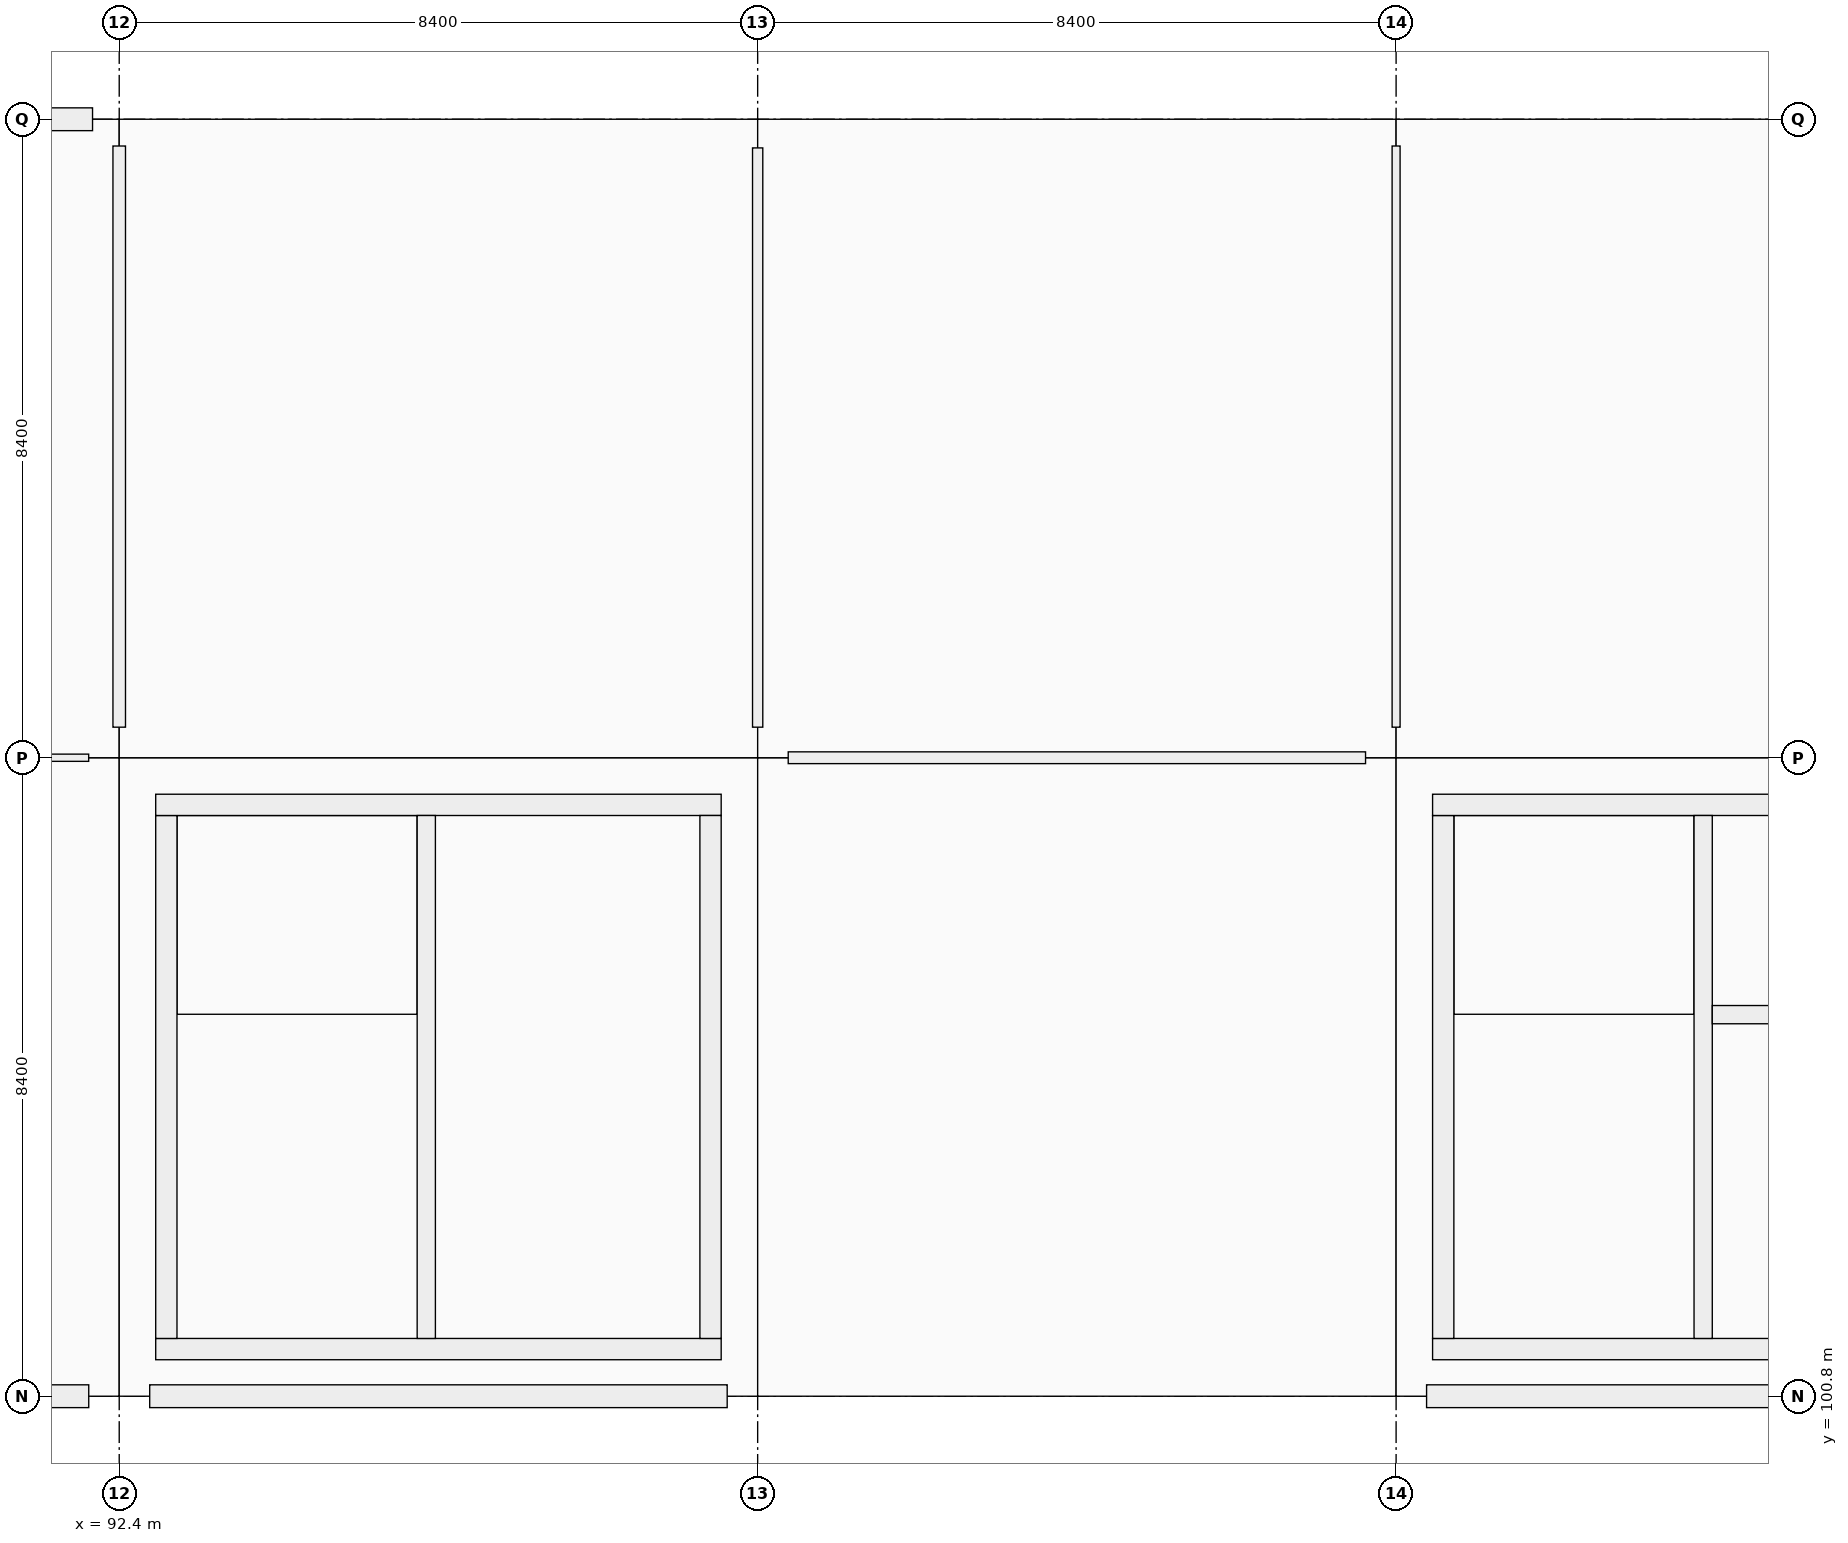
"""IFC4 building model, lengths in metres.
Left out: names, types, materials, properties, quantities, classifications, styles, units other than length and angle.
Written with IfcOpenShell. Run it as: python <this file> out.ifc"""

import sys

from ifc_helpers import new_model, si_unit, direction, frame, frame_2d, origin, origin_2d, place, context, subcontext, project, spatial, rectangle, extrude, element, fill, save


model = new_model("IFC4")
c1 = context("Model", 3, precision=1e-05, world=origin(), true_north=direction((0.0, 1.0)))
c2 = subcontext(c1, "Body", "Model", "MODEL_VIEW")
j1 = project(units=[si_unit("LENGTHUNIT", "METRE"), si_unit("PLANEANGLEUNIT", "RADIAN")], contexts=[c1])
p1 = place(None, origin())
s1 = spatial("IfcSite", under=j1, at=p1, CompositionType="ELEMENT")
p2 = place(p1, origin())
s2 = spatial("IfcBuilding", under=s1, at=p2, CompositionType="ELEMENT")
p3 = place(p2, frame((0.0, 0.0, 14.76)))
s3 = spatial("IfcBuildingStorey", under=s2, at=p3, CompositionType="ELEMENT", Elevation=14.76)
for number, where, z_axis, x_axis in (
    (1, (92.4, 100.8, 0.0), (0.0, 0.0, 1.0), (1.0, 0.0, 0.0)),
    (2, (92.4, 109.2, 0.0), (0.0, 0.0, 1.0), (1.0, 0.0, 0.0)),
):
    element("IfcColumn", number, at=place(p3, frame(where, z_axis=z_axis, x_axis=x_axis)), inside=s3, PredefinedType="COLUMN", context=c2, shape_type="SweptSolid", body=[
        extrude(rectangle(XDim=0.8, YDim=0.8, at=origin_2d()), origin(), (0.0, 0.0, 1.0), 4.32),
    ])
p4 = place(p3, frame((92.4, 117.6, 0.0), z_axis=(0.0, 0.0, 1.0), x_axis=(1.0, 0.0, 0.0)))
e3 = element("IfcColumn", 3, at=p4, inside=s3, PredefinedType="COLUMN", context=c2, shape_type="SweptSolid", body=[
    extrude(rectangle(XDim=0.7, YDim=0.7, at=origin_2d()), origin(), (0.0, 0.0, 1.0), 4.32),
])
for number, where, z_axis, x_axis in (
    (4, (100.8, 100.8, 0.0), (0.0, 0.0, 1.0), (1.0, 0.0, 0.0)),
    (5, (100.8, 109.2, 0.0), (0.0, 0.0, 1.0), (1.0, 0.0, 0.0)),
):
    element("IfcColumn", number, at=place(p3, frame(where, z_axis=z_axis, x_axis=x_axis)), inside=s3, PredefinedType="COLUMN", context=c2, shape_type="SweptSolid", body=[
        extrude(rectangle(XDim=0.8, YDim=0.8, at=origin_2d()), origin(), (0.0, 0.0, 1.0), 4.32),
    ])
p5 = place(p3, frame((100.8, 117.6, 0.0), z_axis=(0.0, 0.0, 1.0), x_axis=(1.0, 0.0, 0.0)))
e6 = element("IfcColumn", 6, at=p5, inside=s3, PredefinedType="COLUMN", context=c2, shape_type="SweptSolid", body=[
    extrude(rectangle(XDim=0.75, YDim=0.75, at=origin_2d()), origin(), (0.0, 0.0, 1.0), 4.32),
])
for number, where, z_axis, x_axis in (
    (7, (109.2, 100.8, 0.0), (0.0, 0.0, 1.0), (1.0, 0.0, 0.0)),
    (8, (109.2, 109.2, 0.0), (0.0, 0.0, 1.0), (1.0, 0.0, 0.0)),
):
    element("IfcColumn", number, at=place(p3, frame(where, z_axis=z_axis, x_axis=x_axis)), inside=s3, PredefinedType="COLUMN", context=c2, shape_type="SweptSolid", body=[
        extrude(rectangle(XDim=0.8, YDim=0.8, at=origin_2d()), origin(), (0.0, 0.0, 1.0), 4.32),
    ])
p6 = place(p3, frame((109.2, 117.6, 0.0), z_axis=(0.0, 0.0, 1.0), x_axis=(1.0, 0.0, 0.0)))
e9 = element("IfcColumn", 9, at=p6, inside=s3, PredefinedType="COLUMN", context=c2, shape_type="SweptSolid", body=[
    extrude(rectangle(XDim=0.7, YDim=0.7, at=origin_2d()), origin(), (0.0, 0.0, 1.0), 4.32),
])
p7 = place(p3, frame((91.999, 100.8, 0.0), z_axis=(0.0, 0.0, 1.0), x_axis=(-1.0, 0.0, 0.0)))
e10 = element("IfcWall", 10, at=p7, inside=s3, PredefinedType="SOLIDWALL", context=c2, shape_type="SweptSolid", body=[
    extrude(rectangle(XDim=7.598, YDim=0.3, at=frame_2d((3.799, 0.0))), origin(), (0.0, 0.0, 1.0), 3.37),
])
p8 = place(p7, frame((2.824, 0.0, 0.9)))
e11 = element("IfcOpeningElement", 11, at=p8, cuts=e10, PredefinedType="OPENING", context=c2, shape_type="SweptSolid", body=[
    extrude(rectangle(XDim=1.95, YDim=1.6, at=frame_2d((0.975, 0.8))), frame((0.0, 0.15, 0.0), z_axis=(0.0, -1.0, 0.0), x_axis=(1.0, 0.0, 0.0)), (0.0, 0.0, 1.0), 0.3),
])
p9 = place(p3, frame((84.376, 117.6, 0.0), z_axis=(0.0, 0.0, 1.0), x_axis=(1.0, 0.0, 0.0)))
e12 = element("IfcWall", 12, at=p9, inside=s3, PredefinedType="SOLIDWALL", context=c2, shape_type="SweptSolid", body=[
    extrude(rectangle(XDim=7.673, YDim=0.3, at=frame_2d((3.836, 0.0))), origin(), (0.0, 0.0, 1.0), 3.37),
])
p10 = place(p9, frame((2.662, 0.0, 0.9)))
e13 = element("IfcOpeningElement", 13, at=p10, cuts=e12, PredefinedType="OPENING", context=c2, shape_type="SweptSolid", body=[
    extrude(rectangle(XDim=2.35, YDim=1.6, at=frame_2d((1.175, 0.8))), frame((0.0, 0.15, 0.0), z_axis=(0.0, -1.0, 0.0), x_axis=(1.0, 0.0, 0.0)), (0.0, 0.0, 1.0), 0.3),
])
for number, where, z_axis, x_axis in (
    (14, (100.399, 100.8, 0.0), (0.0, 0.0, 1.0), (-1.0, 0.0, 0.0)),
    (15, (117.199, 100.8, 0.0), (0.0, 0.0, 1.0), (-1.0, 0.0, 0.0)),
):
    element("IfcWall", number, at=place(p3, frame(where, z_axis=z_axis, x_axis=x_axis)), inside=s3, PredefinedType="SOLIDWALL", context=c2, shape_type="SweptSolid", body=[
        extrude(rectangle(XDim=7.598, YDim=0.3, at=frame_2d((3.799, 0.0))), origin(), (0.0, 0.0, 1.0), 3.37),
    ])
p11 = place(p3, frame((117.12, 101.42, 0.0), z_axis=(0.0, 0.0, 1.0), x_axis=(-1.0, 0.0, 0.0)))
e16 = element("IfcWall", 16, at=p11, inside=s3, PredefinedType="SHEAR", context=c2, shape_type="SweptSolid", body=[
    extrude(rectangle(XDim=7.44, YDim=0.28, at=frame_2d((3.72, 0.0))), origin(), (0.0, 0.0, 1.0), 4.32),
])
p12 = place(p3, frame((109.82, 101.56, 0.0), z_axis=(0.0, 0.0, 1.0), x_axis=(0.0, 1.0, 0.0)))
e17 = element("IfcWall", 17, at=p12, inside=s3, PredefinedType="SHEAR", context=c2, shape_type="SweptSolid", body=[
    extrude(rectangle(XDim=6.88, YDim=0.28, at=frame_2d((3.44, 0.0))), origin(), (0.0, 0.0, 1.0), 4.32),
])
p13 = place(p3, frame((109.68, 108.58, 0.0), z_axis=(0.0, 0.0, 1.0), x_axis=(1.0, 0.0, 0.0)))
e18 = element("IfcWall", 18, at=p13, inside=s3, PredefinedType="SHEAR", context=c2, shape_type="SweptSolid", body=[
    extrude(rectangle(XDim=7.44, YDim=0.28, at=frame_2d((3.72, 0.0))), origin(), (0.0, 0.0, 1.0), 4.32),
])
p14 = place(p3, frame((113.24, 101.56, 0.0), z_axis=(0.0, 0.0, 1.0), x_axis=(0.0, 1.0, 0.0)))
e19 = element("IfcWall", 19, at=p14, inside=s3, PredefinedType="SHEAR", context=c2, shape_type="SweptSolid", body=[
    extrude(rectangle(XDim=6.88, YDim=0.24, at=frame_2d((3.44, 0.0))), origin(), (0.0, 0.0, 1.0), 4.32),
])
p15 = place(p14, frame((0.12, 0.0, 0.0)))
e20 = element("IfcOpeningElement", 20, at=p15, cuts=e19, PredefinedType="OPENING", context=c2, shape_type="SweptSolid", body=[
    extrude(rectangle(XDim=1.0, YDim=2.15, at=frame_2d((0.5, 1.075))), frame((0.0, 0.12, 0.0), z_axis=(0.0, -1.0, 0.0), x_axis=(1.0, 0.0, 0.0)), (0.0, 0.0, 1.0), 0.24),
])
p16 = place(p3, frame((113.36, 105.82, 0.0), z_axis=(0.0, 0.0, 1.0), x_axis=(1.0, 0.0, 0.0)))
e21 = element("IfcWall", 21, at=p16, inside=s3, PredefinedType="SHEAR", context=c2, shape_type="SweptSolid", body=[
    extrude(rectangle(XDim=3.48, YDim=0.24, at=frame_2d((1.74, 0.0))), origin(), (0.0, 0.0, 1.0), 4.32),
])
p17 = place(p16, frame((1.14, 0.0, 0.0)))
e22 = element("IfcOpeningElement", 22, at=p17, cuts=e21, PredefinedType="OPENING", context=c2, shape_type="SweptSolid", body=[
    extrude(rectangle(XDim=1.2, YDim=2.2, at=frame_2d((0.6, 1.1))), frame((0.0, 0.12, 0.0), z_axis=(0.0, -1.0, 0.0), x_axis=(1.0, 0.0, 0.0)), (0.0, 0.0, 1.0), 0.24),
])
p18 = place(p3, frame((100.32, 101.42, 0.0), z_axis=(0.0, 0.0, 1.0), x_axis=(-1.0, 0.0, 0.0)))
e23 = element("IfcWall", 23, at=p18, inside=s3, PredefinedType="SHEAR", context=c2, shape_type="SweptSolid", body=[
    extrude(rectangle(XDim=7.44, YDim=0.28, at=frame_2d((3.72, 0.0))), origin(), (0.0, 0.0, 1.0), 4.32),
])
p19 = place(p3, frame((93.02, 101.56, 0.0), z_axis=(0.0, 0.0, 1.0), x_axis=(0.0, 1.0, 0.0)))
e24 = element("IfcWall", 24, at=p19, inside=s3, PredefinedType="SHEAR", context=c2, shape_type="SweptSolid", body=[
    extrude(rectangle(XDim=6.88, YDim=0.28, at=frame_2d((3.44, 0.0))), origin(), (0.0, 0.0, 1.0), 4.32),
])
p20 = place(p3, frame((92.88, 108.58, 0.0), z_axis=(0.0, 0.0, 1.0), x_axis=(1.0, 0.0, 0.0)))
e25 = element("IfcWall", 25, at=p20, inside=s3, PredefinedType="SHEAR", context=c2, shape_type="SweptSolid", body=[
    extrude(rectangle(XDim=7.44, YDim=0.28, at=frame_2d((3.72, 0.0))), origin(), (0.0, 0.0, 1.0), 4.32),
])
p21 = place(p3, frame((100.18, 108.44, 0.0), z_axis=(0.0, 0.0, 1.0), x_axis=(0.0, -1.0, 0.0)))
e26 = element("IfcWall", 26, at=p21, inside=s3, PredefinedType="SHEAR", context=c2, shape_type="SweptSolid", body=[
    extrude(rectangle(XDim=6.88, YDim=0.28, at=frame_2d((3.44, 0.0))), origin(), (0.0, 0.0, 1.0), 4.32),
])
p22 = place(p21, frame((3.99, 0.0, 0.0)))
e27 = element("IfcOpeningElement", 27, at=p22, cuts=e26, PredefinedType="OPENING", context=c2, shape_type="SweptSolid", body=[
    extrude(rectangle(XDim=1.5, YDim=2.15, at=frame_2d((0.75, 1.075))), frame((0.0, 0.14, 0.0), z_axis=(0.0, -1.0, 0.0), x_axis=(1.0, 0.0, 0.0)), (0.0, 0.0, 1.0), 0.28),
])
p23 = place(p3, frame((96.44, 101.56, 0.0), z_axis=(0.0, 0.0, 1.0), x_axis=(0.0, 1.0, 0.0)))
e28 = element("IfcWall", 28, at=p23, inside=s3, PredefinedType="SHEAR", context=c2, shape_type="SweptSolid", body=[
    extrude(rectangle(XDim=6.88, YDim=0.24, at=frame_2d((3.44, 0.0))), origin(), (0.0, 0.0, 1.0), 4.32),
])
p24 = place(p23, frame((0.12, 0.0, 0.0)))
e29 = element("IfcOpeningElement", 29, at=p24, cuts=e28, PredefinedType="OPENING", context=c2, shape_type="SweptSolid", body=[
    extrude(rectangle(XDim=1.0, YDim=2.15, at=frame_2d((0.5, 1.075))), frame((0.0, 0.12, 0.0), z_axis=(0.0, -1.0, 0.0), x_axis=(1.0, 0.0, 0.0)), (0.0, 0.0, 1.0), 0.24),
])
p25 = place(p3, frame((84.402, 109.2, 0.0), z_axis=(0.0, 0.0, 1.0), x_axis=(1.0, 0.0, 0.0)))
e30 = element("IfcWall", 30, at=p25, inside=s3, PredefinedType="PARTITIONING", context=c2, shape_type="SweptSolid", body=[
    extrude(rectangle(XDim=7.596, YDim=0.095, at=frame_2d((3.798, 0.0))), origin(), (0.0, 0.0, 1.0), 3.19),
])
p26 = place(p25, frame((3.308, 0.0, 0.0)))
e31 = element("IfcOpeningElement", 31, at=p26, cuts=e30, PredefinedType="OPENING", context=c2, shape_type="SweptSolid", body=[
    extrude(rectangle(XDim=0.98, YDim=2.18, at=frame_2d((0.49, 1.09))), frame((0.0, 0.047, 0.0), z_axis=(0.0, -1.0, 0.0), x_axis=(1.0, 0.0, 0.0)), (0.0, 0.0, 1.0), 0.095),
])
p27 = place(p3, frame((101.202, 109.2, 0.0), z_axis=(0.0, 0.0, 1.0), x_axis=(1.0, 0.0, 0.0)))
e32 = element("IfcWall", 32, at=p27, inside=s3, PredefinedType="PARTITIONING", context=c2, shape_type="SweptSolid", body=[
    extrude(rectangle(XDim=7.596, YDim=0.155, at=frame_2d((3.798, 0.0))), origin(), (0.0, 0.0, 1.0), 3.19),
])
p28 = place(p27, frame((3.273, 0.0, 0.0)))
e33 = element("IfcOpeningElement", 33, at=p28, cuts=e32, PredefinedType="OPENING", context=c2, shape_type="SweptSolid", body=[
    extrude(rectangle(XDim=1.05, YDim=2.12, at=frame_2d((0.525, 1.06))), frame((0.0, 0.078, 0.0), z_axis=(0.0, -1.0, 0.0), x_axis=(1.0, 0.0, 0.0)), (0.0, 0.0, 1.0), 0.155),
])
p29 = place(p3, frame((92.4, 109.602, 0.0), z_axis=(0.0, 0.0, 1.0), x_axis=(0.0, 1.0, 0.0)))
e34 = element("IfcWall", 34, at=p29, inside=s3, PredefinedType="PARTITIONING", context=c2, shape_type="SweptSolid", body=[
    extrude(rectangle(XDim=7.646, YDim=0.165, at=frame_2d((3.823, 0.0))), origin(), (0.0, 0.0, 1.0), 3.19),
])
p30 = place(p29, frame((3.323, 0.0, 0.0)))
e35 = element("IfcOpeningElement", 35, at=p30, cuts=e34, PredefinedType="OPENING", context=c2, shape_type="SweptSolid", body=[
    extrude(rectangle(XDim=1.0, YDim=2.2, at=frame_2d((0.5, 1.1))), frame((0.0, 0.083, 0.0), z_axis=(0.0, -1.0, 0.0), x_axis=(1.0, 0.0, 0.0)), (0.0, 0.0, 1.0), 0.165),
])
p31 = place(p3, frame((100.8, 109.602, 0.0), z_axis=(0.0, 0.0, 1.0), x_axis=(0.0, 1.0, 0.0)))
e36 = element("IfcWall", 36, at=p31, inside=s3, PredefinedType="PARTITIONING", context=c2, shape_type="SweptSolid", body=[
    extrude(rectangle(XDim=7.621, YDim=0.135, at=frame_2d((3.811, 0.0))), origin(), (0.0, 0.0, 1.0), 3.19),
])
p32 = place(p31, frame((3.291, 0.0, 0.0)))
e37 = element("IfcOpeningElement", 37, at=p32, cuts=e36, PredefinedType="OPENING", context=c2, shape_type="SweptSolid", body=[
    extrude(rectangle(XDim=1.04, YDim=2.2, at=frame_2d((0.52, 1.1))), frame((0.0, 0.067, 0.0), z_axis=(0.0, -1.0, 0.0), x_axis=(1.0, 0.0, 0.0)), (0.0, 0.0, 1.0), 0.135),
])
p33 = place(p3, frame((109.2, 109.602, 0.0), z_axis=(0.0, 0.0, 1.0), x_axis=(0.0, 1.0, 0.0)))
e38 = element("IfcWall", 38, at=p33, inside=s3, PredefinedType="PARTITIONING", context=c2, shape_type="SweptSolid", body=[
    extrude(rectangle(XDim=7.646, YDim=0.105, at=frame_2d((3.823, 0.0))), origin(), (0.0, 0.0, 1.0), 3.19),
])
p34 = place(p33, frame((3.333, 0.0, 0.0)))
e39 = element("IfcOpeningElement", 39, at=p34, cuts=e38, PredefinedType="OPENING", context=c2, shape_type="SweptSolid", body=[
    extrude(rectangle(XDim=0.98, YDim=2.18, at=frame_2d((0.49, 1.09))), frame((0.0, 0.052, 0.0), z_axis=(0.0, -1.0, 0.0), x_axis=(1.0, 0.0, 0.0)), (0.0, 0.0, 1.0), 0.105),
])
p35 = place(p15, origin())
e40 = element("IfcDoor", 40, at=p35, inside=s3, OperationType="SINGLE_SWING_LEFT", PredefinedType="DOOR", context=c2, shape_type="SweptSolid", body=[
    extrude(rectangle(XDim=1.0, YDim=2.15, at=frame_2d((0.5, 1.075))), frame((0.0, 0.025, 0.0), z_axis=(0.0, -1.0, 0.0), x_axis=(1.0, 0.0, 0.0)), (0.0, 0.0, 1.0), 0.05),
])
fill(e20, e40)
p36 = place(p24, origin())
e41 = element("IfcDoor", 41, at=p36, inside=s3, OperationType="SINGLE_SWING_LEFT", PredefinedType="DOOR", context=c2, shape_type="SweptSolid", body=[
    extrude(rectangle(XDim=1.0, YDim=2.15, at=frame_2d((0.5, 1.075))), frame((0.0, 0.025, 0.0), z_axis=(0.0, -1.0, 0.0), x_axis=(1.0, 0.0, 0.0)), (0.0, 0.0, 1.0), 0.05),
])
fill(e29, e41)
p37 = place(p22, origin())
e42 = element("IfcDoor", 42, at=p37, inside=s3, OperationType="DOUBLE_DOOR_SINGLE_SWING", PredefinedType="DOOR", context=c2, shape_type="SweptSolid", body=[
    extrude(rectangle(XDim=1.5, YDim=2.15, at=frame_2d((0.75, 1.075))), frame((0.0, 0.025, 0.0), z_axis=(0.0, -1.0, 0.0), x_axis=(1.0, 0.0, 0.0)), (0.0, 0.0, 1.0), 0.05),
])
fill(e27, e42)
p38 = place(p28, origin())
e43 = element("IfcDoor", 43, at=p38, inside=s3, OperationType="SINGLE_SWING_RIGHT", PredefinedType="DOOR", context=c2, shape_type="SweptSolid", body=[
    extrude(rectangle(XDim=1.05, YDim=2.12, at=frame_2d((0.525, 1.06))), frame((0.0, 0.025, 0.0), z_axis=(0.0, -1.0, 0.0), x_axis=(1.0, 0.0, 0.0)), (0.0, 0.0, 1.0), 0.05),
])
fill(e33, e43)
p39 = place(p30, origin())
e44 = element("IfcDoor", 44, at=p39, inside=s3, OperationType="SINGLE_SWING_RIGHT", PredefinedType="DOOR", context=c2, shape_type="SweptSolid", body=[
    extrude(rectangle(XDim=1.0, YDim=2.2, at=frame_2d((0.5, 1.1))), frame((0.0, 0.025, 0.0), z_axis=(0.0, -1.0, 0.0), x_axis=(1.0, 0.0, 0.0)), (0.0, 0.0, 1.0), 0.05),
])
fill(e35, e44)
p40 = place(p34, origin())
e45 = element("IfcDoor", 45, at=p40, inside=s3, OperationType="SINGLE_SWING_LEFT", PredefinedType="DOOR", context=c2, shape_type="SweptSolid", body=[
    extrude(rectangle(XDim=0.98, YDim=2.18, at=frame_2d((0.49, 1.09))), frame((0.0, 0.025, 0.0), z_axis=(0.0, -1.0, 0.0), x_axis=(1.0, 0.0, 0.0)), (0.0, 0.0, 1.0), 0.05),
])
fill(e39, e45)
p41 = place(p32, origin())
e46 = element("IfcDoor", 46, at=p41, inside=s3, OperationType="SINGLE_SWING_LEFT", PredefinedType="DOOR", context=c2, shape_type="SweptSolid", body=[
    extrude(rectangle(XDim=1.04, YDim=2.2, at=frame_2d((0.52, 1.1))), frame((0.0, 0.025, 0.0), z_axis=(0.0, -1.0, 0.0), x_axis=(1.0, 0.0, 0.0)), (0.0, 0.0, 1.0), 0.05),
])
fill(e37, e46)
save(model, sys.argv[1])
